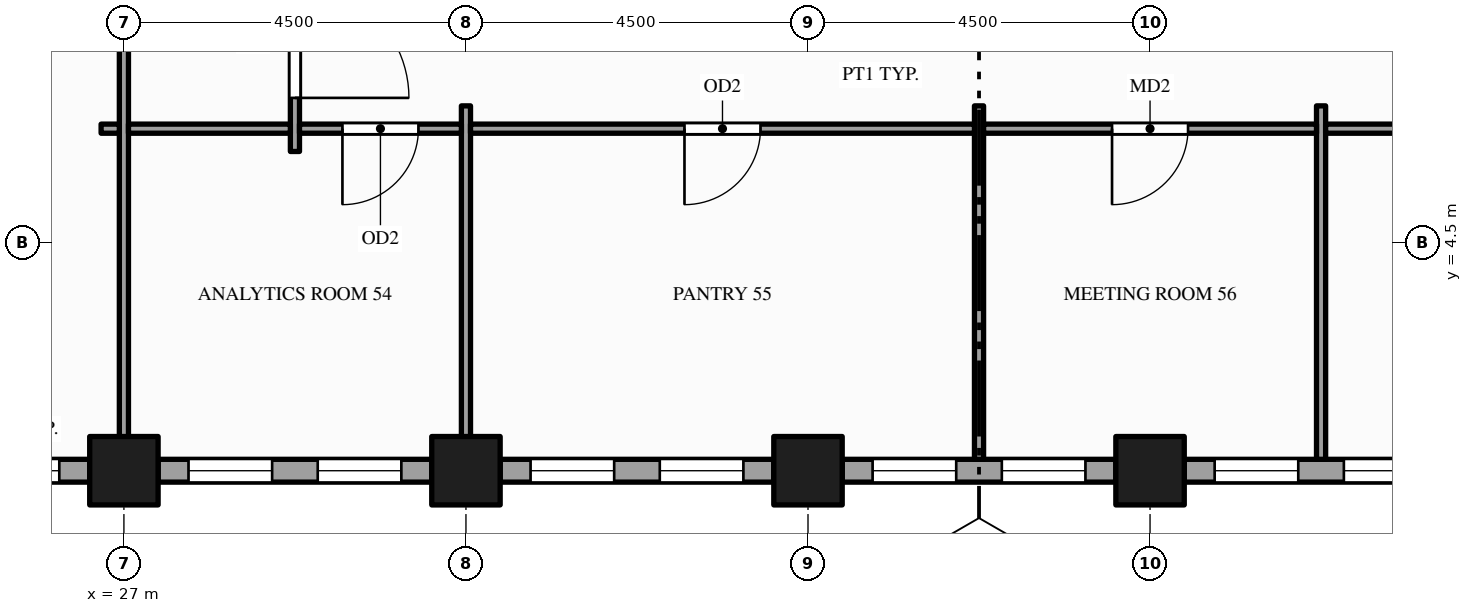
"""IFC4 building model, lengths in metres.
Left out: names, types, materials, properties, quantities, classifications, styles, units other than length and angle.
Written with IfcOpenShell. Run it as: python <this file> out.ifc"""

import sys

from ifc_helpers import new_model, si_unit, direction, frame, frame_2d, origin, origin_2d, place, context, subcontext, project, spatial, rectangle, hollow_rectangle, extrude, element, fill, save


model = new_model("IFC4")
c1 = context("Model", 3, precision=1e-05, world=origin(), true_north=direction((0.0, 1.0)))
c2 = subcontext(c1, "Body", "Model", "MODEL_VIEW")
j1 = project(units=[si_unit("LENGTHUNIT", "METRE"), si_unit("PLANEANGLEUNIT", "RADIAN")], contexts=[c1])
p1 = place(None, origin())
s1 = spatial("IfcSite", under=j1, at=p1, CompositionType="ELEMENT")
p2 = place(p1, origin())
s2 = spatial("IfcBuilding", under=s1, at=p2, CompositionType="ELEMENT")
p3 = place(p2, frame((0.0, 0.0, 183.0)))
s3 = spatial("IfcBuildingStorey", under=s2, at=p3, CompositionType="ELEMENT", Elevation=183.0)
for number, where, z_axis, x_axis in (
    (1, (27.0, 1.5, -0.15), (0.0, 0.0, 1.0), (1.0, 0.0, 0.0)),
    (2, (31.5, 1.5, -0.15), (0.0, 0.0, 1.0), (1.0, 0.0, 0.0)),
    (3, (36.0, 1.5, -0.15), (0.0, 0.0, 1.0), (1.0, 0.0, 0.0)),
    (4, (40.5, 1.5, -0.15), (0.0, 0.0, 1.0), (1.0, 0.0, 0.0)),
):
    element("IfcColumn", number, at=place(p3, frame(where, z_axis=z_axis, x_axis=x_axis)), inside=s3, PredefinedType="COLUMN", context=c2, shape_type="SweptSolid", body=[
        extrude(hollow_rectangle(XDim=0.9, YDim=0.9, WallThickness=0.045, at=origin_2d()), origin(), (0.0, 0.0, 1.0), 3.9),
    ])
p4 = place(p3, frame((22.95, 1.5, 0.0), z_axis=(0.0, 0.0, 1.0), x_axis=(1.0, 0.0, 0.0)))
e5 = element("IfcWall", 5, at=p4, inside=s3, PredefinedType="STANDARD", context=c2, shape_type="SweptSolid", body=[
    extrude(rectangle(XDim=3.6, YDim=0.3, at=frame_2d((1.8, 0.0))), origin(), (0.0, 0.0, 1.0), 2.77),
])
p5 = place(p4, frame((0.4, 0.0, 0.9)))
e6 = element("IfcOpeningElement", 6, at=p5, cuts=e5, PredefinedType="OPENING", context=c2, shape_type="SweptSolid", body=[
    extrude(rectangle(XDim=1.1, YDim=1.5, at=frame_2d((0.55, 0.75))), frame((0.0, 0.16, 0.0), z_axis=(0.0, -1.0, 0.0), x_axis=(1.0, 0.0, 0.0)), (0.0, 0.0, 1.0), 0.32),
])
p6 = place(p4, frame((2.1, 0.0, 0.9)))
e7 = element("IfcOpeningElement", 7, at=p6, cuts=e5, PredefinedType="OPENING", context=c2, shape_type="SweptSolid", body=[
    extrude(rectangle(XDim=1.1, YDim=1.5, at=frame_2d((0.55, 0.75))), frame((0.0, 0.16, 0.0), z_axis=(0.0, -1.0, 0.0), x_axis=(1.0, 0.0, 0.0)), (0.0, 0.0, 1.0), 0.32),
])
p7 = place(p3, frame((27.45, 1.5, 0.0), z_axis=(0.0, 0.0, 1.0), x_axis=(1.0, 0.0, 0.0)))
e8 = element("IfcWall", 8, at=p7, inside=s3, PredefinedType="STANDARD", context=c2, shape_type="SweptSolid", body=[
    extrude(rectangle(XDim=3.6, YDim=0.3, at=frame_2d((1.8, 0.0))), origin(), (0.0, 0.0, 1.0), 2.77),
])
p8 = place(p7, frame((0.4, 0.0, 0.9)))
e9 = element("IfcOpeningElement", 9, at=p8, cuts=e8, PredefinedType="OPENING", context=c2, shape_type="SweptSolid", body=[
    extrude(rectangle(XDim=1.1, YDim=1.5, at=frame_2d((0.55, 0.75))), frame((0.0, 0.16, 0.0), z_axis=(0.0, -1.0, 0.0), x_axis=(1.0, 0.0, 0.0)), (0.0, 0.0, 1.0), 0.32),
])
p9 = place(p7, frame((2.1, 0.0, 0.9)))
e10 = element("IfcOpeningElement", 10, at=p9, cuts=e8, PredefinedType="OPENING", context=c2, shape_type="SweptSolid", body=[
    extrude(rectangle(XDim=1.1, YDim=1.5, at=frame_2d((0.55, 0.75))), frame((0.0, 0.16, 0.0), z_axis=(0.0, -1.0, 0.0), x_axis=(1.0, 0.0, 0.0)), (0.0, 0.0, 1.0), 0.32),
])
p10 = place(p3, frame((31.95, 1.5, 0.0), z_axis=(0.0, 0.0, 1.0), x_axis=(1.0, 0.0, 0.0)))
e11 = element("IfcWall", 11, at=p10, inside=s3, PredefinedType="STANDARD", context=c2, shape_type="SweptSolid", body=[
    extrude(rectangle(XDim=3.6, YDim=0.3, at=frame_2d((1.8, 0.0))), origin(), (0.0, 0.0, 1.0), 2.77),
])
p11 = place(p10, frame((0.4, 0.0, 0.9)))
e12 = element("IfcOpeningElement", 12, at=p11, cuts=e11, PredefinedType="OPENING", context=c2, shape_type="SweptSolid", body=[
    extrude(rectangle(XDim=1.1, YDim=1.5, at=frame_2d((0.55, 0.75))), frame((0.0, 0.16, 0.0), z_axis=(0.0, -1.0, 0.0), x_axis=(1.0, 0.0, 0.0)), (0.0, 0.0, 1.0), 0.32),
])
p12 = place(p10, frame((2.1, 0.0, 0.9)))
e13 = element("IfcOpeningElement", 13, at=p12, cuts=e11, PredefinedType="OPENING", context=c2, shape_type="SweptSolid", body=[
    extrude(rectangle(XDim=1.1, YDim=1.5, at=frame_2d((0.55, 0.75))), frame((0.0, 0.16, 0.0), z_axis=(0.0, -1.0, 0.0), x_axis=(1.0, 0.0, 0.0)), (0.0, 0.0, 1.0), 0.32),
])
p13 = place(p3, frame((36.45, 1.5, 0.0), z_axis=(0.0, 0.0, 1.0), x_axis=(1.0, 0.0, 0.0)))
e14 = element("IfcWall", 14, at=p13, inside=s3, PredefinedType="STANDARD", context=c2, shape_type="SweptSolid", body=[
    extrude(rectangle(XDim=3.6, YDim=0.3, at=frame_2d((1.8, 0.0))), origin(), (0.0, 0.0, 1.0), 2.77),
])
p14 = place(p13, frame((0.4, 0.0, 0.9)))
e15 = element("IfcOpeningElement", 15, at=p14, cuts=e14, PredefinedType="OPENING", context=c2, shape_type="SweptSolid", body=[
    extrude(rectangle(XDim=1.1, YDim=1.5, at=frame_2d((0.55, 0.75))), frame((0.0, 0.16, 0.0), z_axis=(0.0, -1.0, 0.0), x_axis=(1.0, 0.0, 0.0)), (0.0, 0.0, 1.0), 0.32),
])
p15 = place(p13, frame((2.1, 0.0, 0.9)))
e16 = element("IfcOpeningElement", 16, at=p15, cuts=e14, PredefinedType="OPENING", context=c2, shape_type="SweptSolid", body=[
    extrude(rectangle(XDim=1.1, YDim=1.5, at=frame_2d((0.55, 0.75))), frame((0.0, 0.16, 0.0), z_axis=(0.0, -1.0, 0.0), x_axis=(1.0, 0.0, 0.0)), (0.0, 0.0, 1.0), 0.32),
])
p16 = place(p3, frame((40.95, 1.5, 0.0), z_axis=(0.0, 0.0, 1.0), x_axis=(1.0, 0.0, 0.0)))
e17 = element("IfcWall", 17, at=p16, inside=s3, PredefinedType="STANDARD", context=c2, shape_type="SweptSolid", body=[
    extrude(rectangle(XDim=3.6, YDim=0.3, at=frame_2d((1.8, 0.0))), origin(), (0.0, 0.0, 1.0), 2.77),
])
p17 = place(p16, frame((0.4, 0.0, 0.9)))
e18 = element("IfcOpeningElement", 18, at=p17, cuts=e17, PredefinedType="OPENING", context=c2, shape_type="SweptSolid", body=[
    extrude(rectangle(XDim=1.1, YDim=1.5, at=frame_2d((0.55, 0.75))), frame((0.0, 0.16, 0.0), z_axis=(0.0, -1.0, 0.0), x_axis=(1.0, 0.0, 0.0)), (0.0, 0.0, 1.0), 0.32),
])
p18 = place(p16, frame((2.1, 0.0, 0.9)))
e19 = element("IfcOpeningElement", 19, at=p18, cuts=e17, PredefinedType="OPENING", context=c2, shape_type="SweptSolid", body=[
    extrude(rectangle(XDim=1.1, YDim=1.5, at=frame_2d((0.55, 0.75))), frame((0.0, 0.16, 0.0), z_axis=(0.0, -1.0, 0.0), x_axis=(1.0, 0.0, 0.0)), (0.0, 0.0, 1.0), 0.32),
])
p19 = place(p3, frame((27.0, 1.65, 0.0), z_axis=(0.0, 0.0, 1.0), x_axis=(0.0, 1.0, 0.0)))
e20 = element("IfcWall", 20, at=p19, inside=s3, PredefinedType="PARTITIONING", context=c2, shape_type="SweptSolid", body=[
    extrude(rectangle(XDim=22.2, YDim=0.12, at=frame_2d((11.1, 0.0))), origin(), (0.0, 0.0, 1.0), 2.35),
])
p20 = place(p19, frame((7.725, 0.0, 0.0)))
e21 = element("IfcOpeningElement", 21, at=p20, cuts=e20, PredefinedType="OPENING", context=c2, shape_type="SweptSolid", body=[
    extrude(rectangle(XDim=1.5, YDim=2.1, at=frame_2d((0.75, 1.05))), frame((0.0, 0.07, 0.0), z_axis=(0.0, -1.0, 0.0), x_axis=(1.0, 0.0, 0.0)), (0.0, 0.0, 1.0), 0.14),
])
p21 = place(p19, frame((13.125, 0.0, 0.0)))
e22 = element("IfcOpeningElement", 22, at=p21, cuts=e20, PredefinedType="OPENING", context=c2, shape_type="SweptSolid", body=[
    extrude(rectangle(XDim=1.2, YDim=2.1, at=frame_2d((0.6, 1.05))), frame((0.0, 0.07, 0.0), z_axis=(0.0, -1.0, 0.0), x_axis=(1.0, 0.0, 0.0)), (0.0, 0.0, 1.0), 0.14),
])
p22 = place(p3, frame((29.25, 5.7, 0.0), z_axis=(0.0, 0.0, 1.0), x_axis=(0.0, 1.0, 0.0)))
e23 = element("IfcWall", 23, at=p22, inside=s3, PredefinedType="PARTITIONING", context=c2, shape_type="SweptSolid", body=[
    extrude(rectangle(XDim=14.1, YDim=0.12, at=frame_2d((7.05, 0.0))), origin(), (0.0, 0.0, 1.0), 2.77),
])
p23 = place(p22, frame((0.705, 0.0, 0.0)))
e24 = element("IfcOpeningElement", 24, at=p23, cuts=e23, PredefinedType="OPENING", context=c2, shape_type="SweptSolid", body=[
    extrude(rectangle(XDim=1.5, YDim=2.1, at=frame_2d((0.75, 1.05))), frame((0.0, 0.07, 0.0), z_axis=(0.0, -1.0, 0.0), x_axis=(1.0, 0.0, 0.0)), (0.0, 0.0, 1.0), 0.14),
])
p24 = place(p22, frame((11.895, 0.0, 0.0)))
e25 = element("IfcOpeningElement", 25, at=p24, cuts=e23, PredefinedType="OPENING", context=c2, shape_type="SweptSolid", body=[
    extrude(rectangle(XDim=1.5, YDim=2.1, at=frame_2d((0.75, 1.05))), frame((0.0, 0.07, 0.0), z_axis=(0.0, -1.0, 0.0), x_axis=(1.0, 0.0, 0.0)), (0.0, 0.0, 1.0), 0.14),
])
for number, where, z_axis, x_axis in (
    (26, (31.5, 1.65, 0.0), (0.0, 0.0, 1.0), (0.0, 1.0, 0.0)),
    (27, (38.25, 1.65, 0.0), (0.0, 0.0, 1.0), (0.0, 1.0, 0.0)),
    (28, (42.75, 1.65, 0.0), (0.0, 0.0, 1.0), (0.0, 1.0, 0.0)),
):
    element("IfcWall", number, at=place(p3, frame(where, z_axis=z_axis, x_axis=x_axis)), inside=s3, PredefinedType="PARTITIONING", context=c2, shape_type="SweptSolid", body=[
        extrude(rectangle(XDim=4.65, YDim=0.12, at=frame_2d((2.325, 0.0))), origin(), (0.0, 0.0, 1.0), 2.77),
    ])
p25 = place(p3, frame((26.7, 6.0, 0.0), z_axis=(0.0, 0.0, 1.0), x_axis=(1.0, 0.0, 0.0)))
e29 = element("IfcWall", 29, at=p25, inside=s3, PredefinedType="PARTITIONING", context=c2, shape_type="SweptSolid", body=[
    extrude(rectangle(XDim=0.24, YDim=0.12, at=frame_2d((0.12, 0.0))), origin(), (0.0, 0.0, 1.0), 2.77),
])
p26 = place(p3, frame((27.06, 6.0, 0.0), z_axis=(0.0, 0.0, 1.0), x_axis=(1.0, 0.0, 0.0)))
e30 = element("IfcWall", 30, at=p26, inside=s3, PredefinedType="PARTITIONING", context=c2, shape_type="SweptSolid", body=[
    extrude(rectangle(XDim=2.13, YDim=0.12, at=frame_2d((1.065, 0.0))), origin(), (0.0, 0.0, 1.0), 2.77),
])
p27 = place(p3, frame((29.31, 6.0, 0.0), z_axis=(0.0, 0.0, 1.0), x_axis=(1.0, 0.0, 0.0)))
e31 = element("IfcWall", 31, at=p27, inside=s3, PredefinedType="PARTITIONING", context=c2, shape_type="SweptSolid", body=[
    extrude(rectangle(XDim=2.13, YDim=0.12, at=frame_2d((1.065, 0.0))), origin(), (0.0, 0.0, 1.0), 2.77),
])
p28 = place(p27, frame((0.565, 0.0, 0.0)))
e32 = element("IfcOpeningElement", 32, at=p28, cuts=e31, PredefinedType="OPENING", context=c2, shape_type="SweptSolid", body=[
    extrude(rectangle(XDim=1.0, YDim=2.1, at=frame_2d((0.5, 1.05))), frame((0.0, 0.07, 0.0), z_axis=(0.0, -1.0, 0.0), x_axis=(1.0, 0.0, 0.0)), (0.0, 0.0, 1.0), 0.14),
])
p29 = place(p3, frame((31.56, 6.0, 0.0), z_axis=(0.0, 0.0, 1.0), x_axis=(1.0, 0.0, 0.0)))
e33 = element("IfcWall", 33, at=p29, inside=s3, PredefinedType="PARTITIONING", context=c2, shape_type="SweptSolid", body=[
    extrude(rectangle(XDim=6.63, YDim=0.12, at=frame_2d((3.315, 0.0))), origin(), (0.0, 0.0, 1.0), 2.77),
])
p30 = place(p29, frame((2.815, 0.0, 0.0)))
e34 = element("IfcOpeningElement", 34, at=p30, cuts=e33, PredefinedType="OPENING", context=c2, shape_type="SweptSolid", body=[
    extrude(rectangle(XDim=1.0, YDim=2.1, at=frame_2d((0.5, 1.05))), frame((0.0, 0.07, 0.0), z_axis=(0.0, -1.0, 0.0), x_axis=(1.0, 0.0, 0.0)), (0.0, 0.0, 1.0), 0.14),
])
p31 = place(p3, frame((38.31, 6.0, 0.0), z_axis=(0.0, 0.0, 1.0), x_axis=(1.0, 0.0, 0.0)))
e35 = element("IfcWall", 35, at=p31, inside=s3, PredefinedType="PARTITIONING", context=c2, shape_type="SweptSolid", body=[
    extrude(rectangle(XDim=4.38, YDim=0.12, at=frame_2d((2.19, 0.0))), origin(), (0.0, 0.0, 1.0), 2.77),
])
p32 = place(p31, frame((1.69, 0.0, 0.0)))
e36 = element("IfcOpeningElement", 36, at=p32, cuts=e35, PredefinedType="OPENING", context=c2, shape_type="SweptSolid", body=[
    extrude(rectangle(XDim=1.0, YDim=2.1, at=frame_2d((0.5, 1.05))), frame((0.0, 0.07, 0.0), z_axis=(0.0, -1.0, 0.0), x_axis=(1.0, 0.0, 0.0)), (0.0, 0.0, 1.0), 0.14),
])
p33 = place(p3, frame((42.81, 6.0, 0.0), z_axis=(0.0, 0.0, 1.0), x_axis=(1.0, 0.0, 0.0)))
e37 = element("IfcWall", 37, at=p33, inside=s3, PredefinedType="PARTITIONING", context=c2, shape_type="SweptSolid", body=[
    extrude(rectangle(XDim=6.63, YDim=0.12, at=frame_2d((3.315, 0.0))), origin(), (0.0, 0.0, 1.0), 2.77),
])
p34 = place(p33, frame((2.815, 0.0, 0.0)))
e38 = element("IfcOpeningElement", 38, at=p34, cuts=e37, PredefinedType="OPENING", context=c2, shape_type="SweptSolid", body=[
    extrude(rectangle(XDim=1.0, YDim=2.1, at=frame_2d((0.5, 1.05))), frame((0.0, 0.07, 0.0), z_axis=(0.0, -1.0, 0.0), x_axis=(1.0, 0.0, 0.0)), (0.0, 0.0, 1.0), 0.14),
])
p35 = place(p6, origin())
e39 = element("IfcWindow", 39, at=p35, inside=s3, PartitioningType="SINGLE_PANEL", PredefinedType="WINDOW", context=c2, shape_type="SweptSolid", body=[
    extrude(rectangle(XDim=1.1, YDim=1.5, at=frame_2d((0.55, 0.75))), frame((0.0, 0.03, 0.0), z_axis=(0.0, -1.0, 0.0), x_axis=(1.0, 0.0, 0.0)), (0.0, 0.0, 1.0), 0.06),
])
fill(e7, e39)
p36 = place(p8, origin())
e40 = element("IfcWindow", 40, at=p36, inside=s3, PartitioningType="SINGLE_PANEL", PredefinedType="WINDOW", context=c2, shape_type="SweptSolid", body=[
    extrude(rectangle(XDim=1.1, YDim=1.5, at=frame_2d((0.55, 0.75))), frame((0.0, 0.03, 0.0), z_axis=(0.0, -1.0, 0.0), x_axis=(1.0, 0.0, 0.0)), (0.0, 0.0, 1.0), 0.06),
])
fill(e9, e40)
p37 = place(p9, origin())
e41 = element("IfcWindow", 41, at=p37, inside=s3, PartitioningType="SINGLE_PANEL", PredefinedType="WINDOW", context=c2, shape_type="SweptSolid", body=[
    extrude(rectangle(XDim=1.1, YDim=1.5, at=frame_2d((0.55, 0.75))), frame((0.0, 0.03, 0.0), z_axis=(0.0, -1.0, 0.0), x_axis=(1.0, 0.0, 0.0)), (0.0, 0.0, 1.0), 0.06),
])
fill(e10, e41)
p38 = place(p11, origin())
e42 = element("IfcWindow", 42, at=p38, inside=s3, PartitioningType="SINGLE_PANEL", PredefinedType="WINDOW", context=c2, shape_type="SweptSolid", body=[
    extrude(rectangle(XDim=1.1, YDim=1.5, at=frame_2d((0.55, 0.75))), frame((0.0, 0.03, 0.0), z_axis=(0.0, -1.0, 0.0), x_axis=(1.0, 0.0, 0.0)), (0.0, 0.0, 1.0), 0.06),
])
fill(e12, e42)
p39 = place(p12, origin())
e43 = element("IfcWindow", 43, at=p39, inside=s3, PartitioningType="SINGLE_PANEL", PredefinedType="WINDOW", context=c2, shape_type="SweptSolid", body=[
    extrude(rectangle(XDim=1.1, YDim=1.5, at=frame_2d((0.55, 0.75))), frame((0.0, 0.03, 0.0), z_axis=(0.0, -1.0, 0.0), x_axis=(1.0, 0.0, 0.0)), (0.0, 0.0, 1.0), 0.06),
])
fill(e13, e43)
p40 = place(p14, origin())
e44 = element("IfcWindow", 44, at=p40, inside=s3, PartitioningType="SINGLE_PANEL", PredefinedType="WINDOW", context=c2, shape_type="SweptSolid", body=[
    extrude(rectangle(XDim=1.1, YDim=1.5, at=frame_2d((0.55, 0.75))), frame((0.0, 0.03, 0.0), z_axis=(0.0, -1.0, 0.0), x_axis=(1.0, 0.0, 0.0)), (0.0, 0.0, 1.0), 0.06),
])
fill(e15, e44)
p41 = place(p15, origin())
e45 = element("IfcWindow", 45, at=p41, inside=s3, PartitioningType="SINGLE_PANEL", PredefinedType="WINDOW", context=c2, shape_type="SweptSolid", body=[
    extrude(rectangle(XDim=1.1, YDim=1.5, at=frame_2d((0.55, 0.75))), frame((0.0, 0.03, 0.0), z_axis=(0.0, -1.0, 0.0), x_axis=(1.0, 0.0, 0.0)), (0.0, 0.0, 1.0), 0.06),
])
fill(e16, e45)
p42 = place(p17, origin())
e46 = element("IfcWindow", 46, at=p42, inside=s3, PartitioningType="SINGLE_PANEL", PredefinedType="WINDOW", context=c2, shape_type="SweptSolid", body=[
    extrude(rectangle(XDim=1.1, YDim=1.5, at=frame_2d((0.55, 0.75))), frame((0.0, 0.03, 0.0), z_axis=(0.0, -1.0, 0.0), x_axis=(1.0, 0.0, 0.0)), (0.0, 0.0, 1.0), 0.06),
])
fill(e18, e46)
p43 = place(p18, origin())
e47 = element("IfcWindow", 47, at=p43, inside=s3, PartitioningType="SINGLE_PANEL", PredefinedType="WINDOW", context=c2, shape_type="SweptSolid", body=[
    extrude(rectangle(XDim=1.1, YDim=1.5, at=frame_2d((0.55, 0.75))), frame((0.0, 0.03, 0.0), z_axis=(0.0, -1.0, 0.0), x_axis=(1.0, 0.0, 0.0)), (0.0, 0.0, 1.0), 0.06),
])
fill(e19, e47)
p44 = place(p23, origin())
e48 = element("IfcDoor", 48, at=p44, inside=s3, OperationType="SINGLE_SWING_LEFT", PredefinedType="DOOR", context=c2, shape_type="SweptSolid", body=[
    extrude(rectangle(XDim=1.5, YDim=2.1, at=frame_2d((0.75, 1.05))), frame((0.0, 0.025, 0.0), z_axis=(0.0, -1.0, 0.0), x_axis=(1.0, 0.0, 0.0)), (0.0, 0.0, 1.0), 0.05),
])
fill(e24, e48)
p45 = place(p28, origin())
e49 = element("IfcDoor", 49, at=p45, inside=s3, OperationType="SINGLE_SWING_LEFT", PredefinedType="DOOR", context=c2, shape_type="SweptSolid", body=[
    extrude(rectangle(XDim=1.0, YDim=2.1, at=frame_2d((0.5, 1.05))), frame((0.0, 0.025, 0.0), z_axis=(0.0, -1.0, 0.0), x_axis=(1.0, 0.0, 0.0)), (0.0, 0.0, 1.0), 0.05),
])
fill(e32, e49)
p46 = place(p30, origin())
e50 = element("IfcDoor", 50, at=p46, inside=s3, OperationType="SINGLE_SWING_LEFT", PredefinedType="DOOR", context=c2, shape_type="SweptSolid", body=[
    extrude(rectangle(XDim=1.0, YDim=2.1, at=frame_2d((0.5, 1.05))), frame((0.0, 0.025, 0.0), z_axis=(0.0, -1.0, 0.0), x_axis=(1.0, 0.0, 0.0)), (0.0, 0.0, 1.0), 0.05),
])
fill(e34, e50)
p47 = place(p32, origin())
e51 = element("IfcDoor", 51, at=p47, inside=s3, OperationType="SINGLE_SWING_LEFT", PredefinedType="DOOR", context=c2, shape_type="SweptSolid", body=[
    extrude(rectangle(XDim=1.0, YDim=2.1, at=frame_2d((0.5, 1.05))), frame((0.0, 0.025, 0.0), z_axis=(0.0, -1.0, 0.0), x_axis=(1.0, 0.0, 0.0)), (0.0, 0.0, 1.0), 0.05),
])
fill(e36, e51)
save(model, sys.argv[1])
